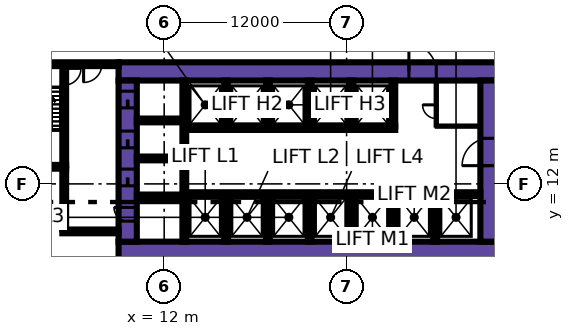
"""IFC4 building model, lengths in metres.
Left out: names, types, materials, properties, quantities, classifications, styles, units other than length and angle.
Written with IfcOpenShell. Run it as: python <this file> out.ifc"""

import sys

from ifc_helpers import new_model, si_unit, direction, frame, frame_2d, origin, place, context, subcontext, project, spatial, rectangle, extrude, element, fill, save


model = new_model("IFC4")
c1 = context("Model", 3, precision=1e-05, world=origin(), true_north=direction((0.0, 1.0)))
c2 = subcontext(c1, "Body", "Model", "MODEL_VIEW")
j1 = project(units=[si_unit("LENGTHUNIT", "METRE"), si_unit("PLANEANGLEUNIT", "RADIAN")], contexts=[c1])
p1 = place(None, origin())
s1 = spatial("IfcSite", under=j1, at=p1, CompositionType="ELEMENT")
p2 = place(p1, origin())
s2 = spatial("IfcBuilding", under=s1, at=p2, CompositionType="ELEMENT")
p3 = place(p2, origin())
s3 = spatial("IfcBuildingStorey", under=s2, at=p3, CompositionType="ELEMENT", Elevation=0.0)
p4 = place(p3, frame((9.0, 7.6, 0.0), z_axis=(0.0, 0.0, 1.0), x_axis=(1.0, 0.0, 0.0)))
e1 = element("IfcWall", 1, at=p4, inside=s3, PredefinedType="SHEAR", context=c2, shape_type="SweptSolid", body=[
    extrude(rectangle(XDim=25.0, YDim=1.2, at=frame_2d((12.5, 0.0))), origin(), (0.0, 0.0, 1.0), 7.2),
])
p5 = place(p3, frame((9.0, 19.4, 0.0), z_axis=(0.0, 0.0, 1.0), x_axis=(1.0, 0.0, 0.0)))
e2 = element("IfcWall", 2, at=p5, inside=s3, PredefinedType="SHEAR", context=c2, shape_type="SweptSolid", body=[
    extrude(rectangle(XDim=25.0, YDim=1.2, at=frame_2d((12.5, 0.0))), origin(), (0.0, 0.0, 1.0), 7.2),
])
p6 = place(p5, frame((19.1, 0.0, 0.0)))
e3 = element("IfcOpeningElement", 3, at=p6, cuts=e2, PredefinedType="OPENING", context=c2, shape_type="SweptSolid", body=[
    extrude(rectangle(XDim=1.8, YDim=2.4, at=frame_2d((0.9, 1.2))), frame((0.0, 0.61, 0.0), z_axis=(0.0, -1.0, 0.0), x_axis=(1.0, 0.0, 0.0)), (0.0, 0.0, 1.0), 1.22),
])
p7 = place(p3, frame((9.6, 8.2, 0.0), z_axis=(0.0, 0.0, 1.0), x_axis=(0.0, 1.0, 0.0)))
e4 = element("IfcWall", 4, at=p7, inside=s3, PredefinedType="SHEAR", context=c2, shape_type="SweptSolid", body=[
    extrude(rectangle(XDim=10.6, YDim=1.2, at=frame_2d((5.3, 0.0))), origin(), (0.0, 0.0, 1.0), 7.2),
])
p8 = place(p7, frame((3.675, 0.0, 0.0)))
e5 = element("IfcOpeningElement", 5, at=p8, cuts=e4, PredefinedType="OPENING", context=c2, shape_type="SweptSolid", body=[
    extrude(rectangle(XDim=1.1, YDim=2.2, at=frame_2d((0.55, 1.1))), frame((0.0, 0.61, 0.0), z_axis=(0.0, -1.0, 0.0), x_axis=(1.0, 0.0, 0.0)), (0.0, 0.0, 1.0), 1.22),
])
p9 = place(p7, frame((6.175, 0.0, 0.0)))
e6 = element("IfcOpeningElement", 6, at=p9, cuts=e4, PredefinedType="OPENING", context=c2, shape_type="SweptSolid", body=[
    extrude(rectangle(XDim=1.1, YDim=2.2, at=frame_2d((0.55, 1.1))), frame((0.0, 0.61, 0.0), z_axis=(0.0, -1.0, 0.0), x_axis=(1.0, 0.0, 0.0)), (0.0, 0.0, 1.0), 1.22),
])
p10 = place(p7, frame((8.8, 0.0, 0.0)))
e7 = element("IfcOpeningElement", 7, at=p10, cuts=e4, PredefinedType="OPENING", context=c2, shape_type="SweptSolid", body=[
    extrude(rectangle(XDim=1.1, YDim=2.2, at=frame_2d((0.55, 1.1))), frame((0.0, 0.61, 0.0), z_axis=(0.0, -1.0, 0.0), x_axis=(1.0, 0.0, 0.0)), (0.0, 0.0, 1.0), 1.22),
])
p11 = place(p7, frame((1.35, 0.0, 0.0)))
e8 = element("IfcOpeningElement", 8, at=p11, cuts=e4, PredefinedType="OPENING", context=c2, shape_type="SweptSolid", body=[
    extrude(rectangle(XDim=0.9, YDim=2.1, at=frame_2d((0.45, 1.05))), frame((0.0, 0.61, 0.0), z_axis=(0.0, -1.0, 0.0), x_axis=(1.0, 0.0, 0.0)), (0.0, 0.0, 1.0), 1.22),
])
p12 = place(p3, frame((33.4, 8.2, 0.0), z_axis=(0.0, 0.0, 1.0), x_axis=(0.0, 1.0, 0.0)))
e9 = element("IfcWall", 9, at=p12, inside=s3, PredefinedType="SHEAR", context=c2, shape_type="SweptSolid", body=[
    extrude(rectangle(XDim=10.6, YDim=1.2, at=frame_2d((5.3, 0.0))), origin(), (0.0, 0.0, 1.0), 7.2),
])
p13 = place(p12, frame((5.0, 0.0, 0.0)))
e10 = element("IfcOpeningElement", 10, at=p13, cuts=e9, PredefinedType="OPENING", context=c2, shape_type="SweptSolid", body=[
    extrude(rectangle(XDim=1.8, YDim=2.4, at=frame_2d((0.9, 1.2))), frame((0.0, 0.61, 0.0), z_axis=(0.0, -1.0, 0.0), x_axis=(1.0, 0.0, 0.0)), (0.0, 0.0, 1.0), 1.22),
])
p14 = place(p3, frame((13.325, 8.2, 0.0), z_axis=(0.0, 0.0, 1.0), x_axis=(0.0, 1.0, 0.0)))
e11 = element("IfcWall", 11, at=p14, inside=s3, PredefinedType="SHEAR", context=c2, shape_type="SweptSolid", body=[
    extrude(rectangle(XDim=10.6, YDim=0.25, at=frame_2d((5.3, 0.0))), origin(), (0.0, 0.0, 1.0), 7.2),
])
p15 = place(p3, frame((13.45, 11.325, 0.0), z_axis=(0.0, 0.0, 1.0), x_axis=(1.0, 0.0, 0.0)))
e12 = element("IfcWall", 12, at=p15, inside=s3, PredefinedType="SHEAR", context=c2, shape_type="SweptSolid", body=[
    extrude(rectangle(XDim=19.35, YDim=0.25, at=frame_2d((9.675, 0.0))), origin(), (0.0, 0.0, 1.0), 7.2),
])
p16 = place(p15, frame((0.65, 0.0, 0.0)))
e13 = element("IfcOpeningElement", 13, at=p16, cuts=e12, PredefinedType="OPENING", context=c2, shape_type="SweptSolid", body=[
    extrude(rectangle(XDim=1.2, YDim=2.2, at=frame_2d((0.6, 1.1))), frame((0.0, 0.135, 0.0), z_axis=(0.0, -1.0, 0.0), x_axis=(1.0, 0.0, 0.0)), (0.0, 0.0, 1.0), 0.27),
])
p17 = place(p15, frame((3.4, 0.0, 0.0)))
e14 = element("IfcOpeningElement", 14, at=p17, cuts=e12, PredefinedType="OPENING", context=c2, shape_type="SweptSolid", body=[
    extrude(rectangle(XDim=1.2, YDim=2.2, at=frame_2d((0.6, 1.1))), frame((0.0, 0.135, 0.0), z_axis=(0.0, -1.0, 0.0), x_axis=(1.0, 0.0, 0.0)), (0.0, 0.0, 1.0), 0.27),
])
p18 = place(p15, frame((6.15, 0.0, 0.0)))
e15 = element("IfcOpeningElement", 15, at=p18, cuts=e12, PredefinedType="OPENING", context=c2, shape_type="SweptSolid", body=[
    extrude(rectangle(XDim=1.2, YDim=2.2, at=frame_2d((0.6, 1.1))), frame((0.0, 0.135, 0.0), z_axis=(0.0, -1.0, 0.0), x_axis=(1.0, 0.0, 0.0)), (0.0, 0.0, 1.0), 0.27),
])
p19 = place(p15, frame((8.9, 0.0, 0.0)))
e16 = element("IfcOpeningElement", 16, at=p19, cuts=e12, PredefinedType="OPENING", context=c2, shape_type="SweptSolid", body=[
    extrude(rectangle(XDim=1.2, YDim=2.2, at=frame_2d((0.6, 1.1))), frame((0.0, 0.135, 0.0), z_axis=(0.0, -1.0, 0.0), x_axis=(1.0, 0.0, 0.0)), (0.0, 0.0, 1.0), 0.27),
])
p20 = place(p15, frame((11.65, 0.0, 0.0)))
e17 = element("IfcOpeningElement", 17, at=p20, cuts=e12, PredefinedType="OPENING", context=c2, shape_type="SweptSolid", body=[
    extrude(rectangle(XDim=1.2, YDim=2.2, at=frame_2d((0.6, 1.1))), frame((0.0, 0.135, 0.0), z_axis=(0.0, -1.0, 0.0), x_axis=(1.0, 0.0, 0.0)), (0.0, 0.0, 1.0), 0.27),
])
p21 = place(p15, frame((14.4, 0.0, 0.0)))
e18 = element("IfcOpeningElement", 18, at=p21, cuts=e12, PredefinedType="OPENING", context=c2, shape_type="SweptSolid", body=[
    extrude(rectangle(XDim=1.2, YDim=2.2, at=frame_2d((0.6, 1.1))), frame((0.0, 0.135, 0.0), z_axis=(0.0, -1.0, 0.0), x_axis=(1.0, 0.0, 0.0)), (0.0, 0.0, 1.0), 0.27),
])
p22 = place(p15, frame((17.15, 0.0, 0.0)))
e19 = element("IfcOpeningElement", 19, at=p22, cuts=e12, PredefinedType="OPENING", context=c2, shape_type="SweptSolid", body=[
    extrude(rectangle(XDim=1.2, YDim=2.2, at=frame_2d((0.6, 1.1))), frame((0.0, 0.135, 0.0), z_axis=(0.0, -1.0, 0.0), x_axis=(1.0, 0.0, 0.0)), (0.0, 0.0, 1.0), 0.27),
])
p23 = place(p3, frame((13.45, 15.675, 0.0), z_axis=(0.0, 0.0, 1.0), x_axis=(1.0, 0.0, 0.0)))
e20 = element("IfcWall", 20, at=p23, inside=s3, PredefinedType="SHEAR", context=c2, shape_type="SweptSolid", body=[
    extrude(rectangle(XDim=13.75, YDim=0.25, at=frame_2d((6.875, 0.0))), origin(), (0.0, 0.0, 1.0), 7.2),
])
p24 = place(p23, frame((11.65, 0.0, 0.0)))
e21 = element("IfcOpeningElement", 21, at=p24, cuts=e20, PredefinedType="OPENING", context=c2, shape_type="SweptSolid", body=[
    extrude(rectangle(XDim=1.2, YDim=2.2, at=frame_2d((0.6, 1.1))), frame((0.0, 0.135, 0.0), z_axis=(0.0, -1.0, 0.0), x_axis=(1.0, 0.0, 0.0)), (0.0, 0.0, 1.0), 0.27),
])
p25 = place(p23, frame((0.65, 0.0, 0.0)))
e22 = element("IfcOpeningElement", 22, at=p25, cuts=e20, PredefinedType="OPENING", context=c2, shape_type="SweptSolid", body=[
    extrude(rectangle(XDim=1.2, YDim=2.2, at=frame_2d((0.6, 1.1))), frame((0.0, 0.135, 0.0), z_axis=(0.0, -1.0, 0.0), x_axis=(1.0, 0.0, 0.0)), (0.0, 0.0, 1.0), 0.27),
])
p26 = place(p23, frame((3.4, 0.0, 0.0)))
e23 = element("IfcOpeningElement", 23, at=p26, cuts=e20, PredefinedType="OPENING", context=c2, shape_type="SweptSolid", body=[
    extrude(rectangle(XDim=1.2, YDim=2.2, at=frame_2d((0.6, 1.1))), frame((0.0, 0.135, 0.0), z_axis=(0.0, -1.0, 0.0), x_axis=(1.0, 0.0, 0.0)), (0.0, 0.0, 1.0), 0.27),
])
p27 = place(p23, frame((6.15, 0.0, 0.0)))
e24 = element("IfcOpeningElement", 24, at=p27, cuts=e20, PredefinedType="OPENING", context=c2, shape_type="SweptSolid", body=[
    extrude(rectangle(XDim=1.2, YDim=2.2, at=frame_2d((0.6, 1.1))), frame((0.0, 0.135, 0.0), z_axis=(0.0, -1.0, 0.0), x_axis=(1.0, 0.0, 0.0)), (0.0, 0.0, 1.0), 0.27),
])
p28 = place(p23, frame((8.9, 0.0, 0.0)))
e25 = element("IfcOpeningElement", 25, at=p28, cuts=e20, PredefinedType="OPENING", context=c2, shape_type="SweptSolid", body=[
    extrude(rectangle(XDim=1.2, YDim=2.2, at=frame_2d((0.6, 1.1))), frame((0.0, 0.135, 0.0), z_axis=(0.0, -1.0, 0.0), x_axis=(1.0, 0.0, 0.0)), (0.0, 0.0, 1.0), 0.27),
])
for number, where, z_axis, x_axis in (
    (26, (10.2, 11.175, 0.0), (0.0, 0.0, 1.0), (1.0, 0.0, 0.0)),
    (27, (10.2, 13.675, 0.0), (0.0, 0.0, 1.0), (1.0, 0.0, 0.0)),
    (28, (10.2, 16.175, 0.0), (0.0, 0.0, 1.0), (1.0, 0.0, 0.0)),
    (29, (16.075, 8.2, 0.0), (0.0, 0.0, 1.0), (0.0, 1.0, 0.0)),
    (30, (18.825, 8.2, 0.0), (0.0, 0.0, 1.0), (0.0, 1.0, 0.0)),
    (31, (21.575, 8.2, 0.0), (0.0, 0.0, 1.0), (0.0, 1.0, 0.0)),
    (32, (24.325, 8.2, 0.0), (0.0, 0.0, 1.0), (0.0, 1.0, 0.0)),
    (33, (27.075, 8.2, 0.0), (0.0, 0.0, 1.0), (0.0, 1.0, 0.0)),
    (34, (29.825, 8.2, 0.0), (0.0, 0.0, 1.0), (0.0, 1.0, 0.0)),
    (35, (16.075, 15.8, 0.0), (0.0, 0.0, 1.0), (0.0, 1.0, 0.0)),
    (36, (18.825, 15.8, 0.0), (0.0, 0.0, 1.0), (0.0, 1.0, 0.0)),
    (37, (21.575, 15.8, 0.0), (0.0, 0.0, 1.0), (0.0, 1.0, 0.0)),
    (38, (24.325, 15.8, 0.0), (0.0, 0.0, 1.0), (0.0, 1.0, 0.0)),
    (39, (27.075, 15.8, 0.0), (0.0, 0.0, 1.0), (0.0, 1.0, 0.0)),
):
    element("IfcWall", number, at=place(p3, frame(where, z_axis=z_axis, x_axis=x_axis)), inside=s3, PredefinedType="SHEAR", context=c2, shape_type="SweptSolid", body=[
        extrude(rectangle(XDim=3.0, YDim=0.25, at=frame_2d((1.5, 0.0))), origin(), (0.0, 0.0, 1.0), 7.2),
    ])
p29 = place(p3, frame((2.1, 19.875, 0.0), z_axis=(0.0, 0.0, 1.0), x_axis=(1.0, 0.0, 0.0)))
e40 = element("IfcWall", 40, at=p29, inside=s3, PredefinedType="SHEAR", context=c2, shape_type="SweptSolid", body=[
    extrude(rectangle(XDim=6.9, YDim=0.25, at=frame_2d((3.45, 0.0))), origin(), (0.0, 0.0, 1.0), 7.2),
])
p30 = place(p29, frame((1.175, 0.0, 0.0)))
e41 = element("IfcOpeningElement", 41, at=p30, cuts=e40, PredefinedType="OPENING", context=c2, shape_type="SweptSolid", body=[
    extrude(rectangle(XDim=1.1, YDim=2.2, at=frame_2d((0.55, 1.1))), frame((0.0, 0.135, 0.0), z_axis=(0.0, -1.0, 0.0), x_axis=(1.0, 0.0, 0.0)), (0.0, 0.0, 1.0), 0.27),
])
p31 = place(p29, frame((4.6, 0.0, 0.0)))
e42 = element("IfcOpeningElement", 42, at=p31, cuts=e40, PredefinedType="OPENING", context=c2, shape_type="SweptSolid", body=[
    extrude(rectangle(XDim=1.2, YDim=2.2, at=frame_2d((0.6, 1.1))), frame((0.0, 0.135, 0.0), z_axis=(0.0, -1.0, 0.0), x_axis=(1.0, 0.0, 0.0)), (0.0, 0.0, 1.0), 0.27),
])
p32 = place(p3, frame((2.1, 13.125, 0.0), z_axis=(0.0, 0.0, 1.0), x_axis=(1.0, 0.0, 0.0)))
e43 = element("IfcWall", 43, at=p32, inside=s3, PredefinedType="SHEAR", context=c2, shape_type="SweptSolid", body=[
    extrude(rectangle(XDim=3.45, YDim=0.25, at=frame_2d((1.725, 0.0))), origin(), (0.0, 0.0, 1.0), 7.2),
])
p33 = place(p3, frame((5.425, 13.25, 0.0), z_axis=(0.0, 0.0, 1.0), x_axis=(0.0, 1.0, 0.0)))
e44 = element("IfcWall", 44, at=p33, inside=s3, PredefinedType="SHEAR", context=c2, shape_type="SweptSolid", body=[
    extrude(rectangle(XDim=6.5, YDim=0.25, at=frame_2d((3.25, 0.0))), origin(), (0.0, 0.0, 1.0), 7.2),
])
p34 = place(p33, frame((5.25, 0.0, 0.0)))
e45 = element("IfcOpeningElement", 45, at=p34, cuts=e44, PredefinedType="OPENING", context=c2, shape_type="SweptSolid", body=[
    extrude(rectangle(XDim=1.1, YDim=2.2, at=frame_2d((0.55, 1.1))), frame((0.0, 0.135, 0.0), z_axis=(0.0, -1.0, 0.0), x_axis=(1.0, 0.0, 0.0)), (0.0, 0.0, 1.0), 0.27),
])
p35 = place(p3, frame((5.3, 8.875, 0.0), z_axis=(0.0, 0.0, 1.0), x_axis=(1.0, 0.0, 0.0)))
e46 = element("IfcWall", 46, at=p35, inside=s3, PredefinedType="SHEAR", context=c2, shape_type="SweptSolid", body=[
    extrude(rectangle(XDim=3.7, YDim=0.25, at=frame_2d((1.85, 0.0))), origin(), (0.0, 0.0, 1.0), 7.2),
])
p36 = place(p3, frame((5.425, 9.0, 0.0), z_axis=(0.0, 0.0, 1.0), x_axis=(0.0, 1.0, 0.0)))
e47 = element("IfcWall", 47, at=p36, inside=s3, PredefinedType="SHEAR", context=c2, shape_type="SweptSolid", body=[
    extrude(rectangle(XDim=4.0, YDim=0.25, at=frame_2d((2.0, 0.0))), origin(), (0.0, 0.0, 1.0), 7.2),
])
p37 = place(p3, frame((29.9, 15.8, 0.0), z_axis=(0.0, 0.0, 1.0), x_axis=(0.0, 1.0, 0.0)))
e48 = element("IfcWall", 48, at=p37, inside=s3, PredefinedType="PARTITIONING", context=c2, shape_type="SweptSolid", body=[
    extrude(rectangle(XDim=3.0, YDim=0.15, at=frame_2d((1.5, 0.0))), origin(), (0.0, 0.0, 1.0), 6.8),
])
p38 = place(p37, frame((0.5, 0.0, 0.0)))
e49 = element("IfcOpeningElement", 49, at=p38, cuts=e48, PredefinedType="OPENING", context=c2, shape_type="SweptSolid", body=[
    extrude(rectangle(XDim=0.9, YDim=2.1, at=frame_2d((0.45, 1.05))), frame((0.0, 0.085, 0.0), z_axis=(0.0, -1.0, 0.0), x_axis=(1.0, 0.0, 0.0)), (0.0, 0.0, 1.0), 0.17),
])
p39 = place(p3, frame((29.9, 15.8, 0.0), z_axis=(0.0, 0.0, 1.0), x_axis=(1.0, 0.0, 0.0)))
e50 = element("IfcWall", 50, at=p39, inside=s3, PredefinedType="PARTITIONING", context=c2, shape_type="SweptSolid", body=[
    extrude(rectangle(XDim=2.9, YDim=0.15, at=frame_2d((1.45, 0.0))), origin(), (0.0, 0.0, 1.0), 6.8),
])
p40 = place(p16, origin())
e51 = element("IfcDoor", 51, at=p40, inside=s3, OperationType="DOUBLE_DOOR_SLIDING", PredefinedType="DOOR", context=c2, shape_type="SweptSolid", body=[
    extrude(rectangle(XDim=1.2, YDim=2.2, at=frame_2d((0.6, 1.1))), frame((0.0, 0.025, 0.0), z_axis=(0.0, -1.0, 0.0), x_axis=(1.0, 0.0, 0.0)), (0.0, 0.0, 1.0), 0.05),
])
fill(e13, e51)
p41 = place(p17, origin())
e52 = element("IfcDoor", 52, at=p41, inside=s3, OperationType="DOUBLE_DOOR_SLIDING", PredefinedType="DOOR", context=c2, shape_type="SweptSolid", body=[
    extrude(rectangle(XDim=1.2, YDim=2.2, at=frame_2d((0.6, 1.1))), frame((0.0, 0.025, 0.0), z_axis=(0.0, -1.0, 0.0), x_axis=(1.0, 0.0, 0.0)), (0.0, 0.0, 1.0), 0.05),
])
fill(e14, e52)
p42 = place(p18, origin())
e53 = element("IfcDoor", 53, at=p42, inside=s3, OperationType="DOUBLE_DOOR_SLIDING", PredefinedType="DOOR", context=c2, shape_type="SweptSolid", body=[
    extrude(rectangle(XDim=1.2, YDim=2.2, at=frame_2d((0.6, 1.1))), frame((0.0, 0.025, 0.0), z_axis=(0.0, -1.0, 0.0), x_axis=(1.0, 0.0, 0.0)), (0.0, 0.0, 1.0), 0.05),
])
fill(e15, e53)
p43 = place(p19, origin())
e54 = element("IfcDoor", 54, at=p43, inside=s3, OperationType="DOUBLE_DOOR_SLIDING", PredefinedType="DOOR", context=c2, shape_type="SweptSolid", body=[
    extrude(rectangle(XDim=1.2, YDim=2.2, at=frame_2d((0.6, 1.1))), frame((0.0, 0.025, 0.0), z_axis=(0.0, -1.0, 0.0), x_axis=(1.0, 0.0, 0.0)), (0.0, 0.0, 1.0), 0.05),
])
fill(e16, e54)
p44 = place(p20, origin())
e55 = element("IfcDoor", 55, at=p44, inside=s3, OperationType="DOUBLE_DOOR_SLIDING", PredefinedType="DOOR", context=c2, shape_type="SweptSolid", body=[
    extrude(rectangle(XDim=1.2, YDim=2.2, at=frame_2d((0.6, 1.1))), frame((0.0, 0.025, 0.0), z_axis=(0.0, -1.0, 0.0), x_axis=(1.0, 0.0, 0.0)), (0.0, 0.0, 1.0), 0.05),
])
fill(e17, e55)
p45 = place(p21, origin())
e56 = element("IfcDoor", 56, at=p45, inside=s3, OperationType="DOUBLE_DOOR_SLIDING", PredefinedType="DOOR", context=c2, shape_type="SweptSolid", body=[
    extrude(rectangle(XDim=1.2, YDim=2.2, at=frame_2d((0.6, 1.1))), frame((0.0, 0.025, 0.0), z_axis=(0.0, -1.0, 0.0), x_axis=(1.0, 0.0, 0.0)), (0.0, 0.0, 1.0), 0.05),
])
fill(e18, e56)
p46 = place(p22, origin())
e57 = element("IfcDoor", 57, at=p46, inside=s3, OperationType="DOUBLE_DOOR_SLIDING", PredefinedType="DOOR", context=c2, shape_type="SweptSolid", body=[
    extrude(rectangle(XDim=1.2, YDim=2.2, at=frame_2d((0.6, 1.1))), frame((0.0, 0.025, 0.0), z_axis=(0.0, -1.0, 0.0), x_axis=(1.0, 0.0, 0.0)), (0.0, 0.0, 1.0), 0.05),
])
fill(e19, e57)
p47 = place(p24, origin())
e58 = element("IfcDoor", 58, at=p47, inside=s3, OperationType="DOUBLE_DOOR_SLIDING", PredefinedType="DOOR", context=c2, shape_type="SweptSolid", body=[
    extrude(rectangle(XDim=1.2, YDim=2.2, at=frame_2d((0.6, 1.1))), frame((0.0, 0.025, 0.0), z_axis=(0.0, -1.0, 0.0), x_axis=(1.0, 0.0, 0.0)), (0.0, 0.0, 1.0), 0.05),
])
fill(e21, e58)
p48 = place(p25, origin())
e59 = element("IfcDoor", 59, at=p48, inside=s3, OperationType="DOUBLE_DOOR_SLIDING", PredefinedType="DOOR", context=c2, shape_type="SweptSolid", body=[
    extrude(rectangle(XDim=1.2, YDim=2.2, at=frame_2d((0.6, 1.1))), frame((0.0, 0.025, 0.0), z_axis=(0.0, -1.0, 0.0), x_axis=(1.0, 0.0, 0.0)), (0.0, 0.0, 1.0), 0.05),
])
fill(e22, e59)
p49 = place(p26, origin())
e60 = element("IfcDoor", 60, at=p49, inside=s3, OperationType="DOUBLE_DOOR_SLIDING", PredefinedType="DOOR", context=c2, shape_type="SweptSolid", body=[
    extrude(rectangle(XDim=1.2, YDim=2.2, at=frame_2d((0.6, 1.1))), frame((0.0, 0.025, 0.0), z_axis=(0.0, -1.0, 0.0), x_axis=(1.0, 0.0, 0.0)), (0.0, 0.0, 1.0), 0.05),
])
fill(e23, e60)
p50 = place(p27, origin())
e61 = element("IfcDoor", 61, at=p50, inside=s3, OperationType="DOUBLE_DOOR_SLIDING", PredefinedType="DOOR", context=c2, shape_type="SweptSolid", body=[
    extrude(rectangle(XDim=1.2, YDim=2.2, at=frame_2d((0.6, 1.1))), frame((0.0, 0.025, 0.0), z_axis=(0.0, -1.0, 0.0), x_axis=(1.0, 0.0, 0.0)), (0.0, 0.0, 1.0), 0.05),
])
fill(e24, e61)
p51 = place(p28, origin())
e62 = element("IfcDoor", 62, at=p51, inside=s3, OperationType="DOUBLE_DOOR_SLIDING", PredefinedType="DOOR", context=c2, shape_type="SweptSolid", body=[
    extrude(rectangle(XDim=1.2, YDim=2.2, at=frame_2d((0.6, 1.1))), frame((0.0, 0.025, 0.0), z_axis=(0.0, -1.0, 0.0), x_axis=(1.0, 0.0, 0.0)), (0.0, 0.0, 1.0), 0.05),
])
fill(e25, e62)
p52 = place(p8, origin())
e63 = element("IfcDoor", 63, at=p52, inside=s3, OperationType="DOUBLE_DOOR_SLIDING", PredefinedType="DOOR", context=c2, shape_type="SweptSolid", body=[
    extrude(rectangle(XDim=1.1, YDim=2.2, at=frame_2d((0.55, 1.1))), frame((0.0, 0.025, 0.0), z_axis=(0.0, -1.0, 0.0), x_axis=(1.0, 0.0, 0.0)), (0.0, 0.0, 1.0), 0.05),
])
fill(e5, e63)
p53 = place(p9, origin())
e64 = element("IfcDoor", 64, at=p53, inside=s3, OperationType="DOUBLE_DOOR_SLIDING", PredefinedType="DOOR", context=c2, shape_type="SweptSolid", body=[
    extrude(rectangle(XDim=1.1, YDim=2.2, at=frame_2d((0.55, 1.1))), frame((0.0, 0.025, 0.0), z_axis=(0.0, -1.0, 0.0), x_axis=(1.0, 0.0, 0.0)), (0.0, 0.0, 1.0), 0.05),
])
fill(e6, e64)
p54 = place(p10, origin())
e65 = element("IfcDoor", 65, at=p54, inside=s3, OperationType="DOUBLE_DOOR_SLIDING", PredefinedType="DOOR", context=c2, shape_type="SweptSolid", body=[
    extrude(rectangle(XDim=1.1, YDim=2.2, at=frame_2d((0.55, 1.1))), frame((0.0, 0.025, 0.0), z_axis=(0.0, -1.0, 0.0), x_axis=(1.0, 0.0, 0.0)), (0.0, 0.0, 1.0), 0.05),
])
fill(e7, e65)
p55 = place(p13, origin())
e66 = element("IfcDoor", 66, at=p55, inside=s3, OperationType="DOUBLE_DOOR_SINGLE_SWING", PredefinedType="DOOR", context=c2, shape_type="SweptSolid", body=[
    extrude(rectangle(XDim=1.8, YDim=2.4, at=frame_2d((0.9, 1.2))), frame((0.0, 0.025, 0.0), z_axis=(0.0, -1.0, 0.0), x_axis=(1.0, 0.0, 0.0)), (0.0, 0.0, 1.0), 0.05),
])
fill(e10, e66)
p56 = place(p6, origin())
e67 = element("IfcDoor", 67, at=p56, inside=s3, OperationType="DOUBLE_DOOR_SINGLE_SWING", PredefinedType="DOOR", context=c2, shape_type="SweptSolid", body=[
    extrude(rectangle(XDim=1.8, YDim=2.4, at=frame_2d((0.9, 1.2))), frame((0.0, 0.025, 0.0), z_axis=(0.0, -1.0, 0.0), x_axis=(1.0, 0.0, 0.0)), (0.0, 0.0, 1.0), 0.05),
])
fill(e3, e67)
p57 = place(p34, origin())
e68 = element("IfcDoor", 68, at=p57, inside=s3, OperationType="SINGLE_SWING_RIGHT", PredefinedType="DOOR", context=c2, shape_type="SweptSolid", body=[
    extrude(rectangle(XDim=1.1, YDim=2.2, at=frame_2d((0.55, 1.1))), frame((0.0, 0.025, 0.0), z_axis=(0.0, -1.0, 0.0), x_axis=(1.0, 0.0, 0.0)), (0.0, 0.0, 1.0), 0.05),
])
fill(e45, e68)
p58 = place(p11, frame((0.9, 0.0, 0.0), z_axis=(0.0, 0.0, 1.0), x_axis=(-1.0, 0.0, 0.0)))
e69 = element("IfcDoor", 69, at=p58, inside=s3, OperationType="SINGLE_SWING_RIGHT", PredefinedType="DOOR", context=c2, shape_type="SweptSolid", body=[
    extrude(rectangle(XDim=0.9, YDim=2.1, at=frame_2d((0.45, 1.05))), frame((0.0, 0.025, 0.0), z_axis=(0.0, -1.0, 0.0), x_axis=(1.0, 0.0, 0.0)), (0.0, 0.0, 1.0), 0.05),
])
fill(e8, e69)
p59 = place(p31, frame((1.2, 0.0, 0.0), z_axis=(0.0, 0.0, 1.0), x_axis=(-1.0, 0.0, 0.0)))
e70 = element("IfcDoor", 70, at=p59, inside=s3, OperationType="SINGLE_SWING_LEFT", PredefinedType="DOOR", context=c2, shape_type="SweptSolid", body=[
    extrude(rectangle(XDim=1.2, YDim=2.2, at=frame_2d((0.6, 1.1))), frame((0.0, 0.025, 0.0), z_axis=(0.0, -1.0, 0.0), x_axis=(1.0, 0.0, 0.0)), (0.0, 0.0, 1.0), 0.05),
])
fill(e42, e70)
p60 = place(p38, frame((0.9, 0.0, 0.0), z_axis=(0.0, 0.0, 1.0), x_axis=(-1.0, 0.0, 0.0)))
e71 = element("IfcDoor", 71, at=p60, inside=s3, OperationType="SINGLE_SWING_RIGHT", PredefinedType="DOOR", context=c2, shape_type="SweptSolid", body=[
    extrude(rectangle(XDim=0.9, YDim=2.1, at=frame_2d((0.45, 1.05))), frame((0.0, 0.025, 0.0), z_axis=(0.0, -1.0, 0.0), x_axis=(1.0, 0.0, 0.0)), (0.0, 0.0, 1.0), 0.05),
])
fill(e49, e71)
save(model, sys.argv[1])
